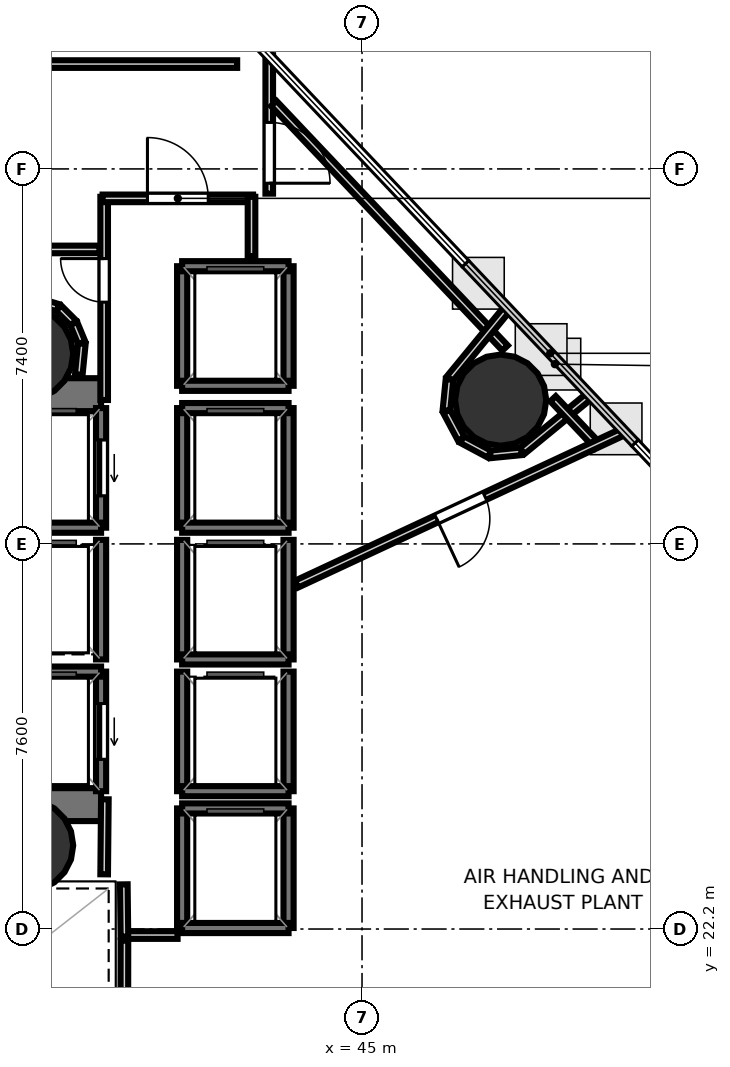
"""IFC4 building model, lengths in metres.
Left out: names, types, materials, properties, quantities, classifications, styles, units other than length and angle.
Written with IfcOpenShell. Run it as: python <this file> out.ifc"""

import sys

from ifc_helpers import new_model, si_unit, direction, frame, frame_2d, origin, origin_2d, place, context, subcontext, project, spatial, rectangle, hollow_circle, extrude, element, fill, save


model = new_model("IFC4")
c1 = context("Model", 3, precision=1e-05, world=origin(), true_north=direction((0.0, 1.0)))
c2 = subcontext(c1, "Body", "Model", "MODEL_VIEW")
j1 = project(units=[si_unit("LENGTHUNIT", "METRE"), si_unit("PLANEANGLEUNIT", "RADIAN")], contexts=[c1])
p1 = place(None, origin())
s1 = spatial("IfcSite", under=j1, at=p1, CompositionType="ELEMENT")
p2 = place(p1, origin())
s2 = spatial("IfcBuilding", under=s1, at=p2, CompositionType="ELEMENT")
p3 = place(p2, frame((0.0, 0.0, 47.9)))
s3 = spatial("IfcBuildingStorey", under=s2, at=p3, CompositionType="ELEMENT", Elevation=47.9)
p4 = place(p3, frame((29.13, 32.745, 0.0), z_axis=(0.0, 0.0, 1.0), x_axis=(1.0, 0.0, 0.0)))
e1 = element("IfcWall", 1, at=p4, inside=s3, PredefinedType="SHEAR", context=c2, shape_type="SweptSolid", body=[
    extrude(rectangle(XDim=10.72, YDim=0.65, at=frame_2d((5.36, 0.0))), origin(), (0.0, 0.0, 1.0), 4.42),
])
p5 = place(p4, frame((1.095, 0.0, 0.0)))
e2 = element("IfcOpeningElement", 2, at=p5, cuts=e1, PredefinedType="OPENING", context=c2, shape_type="SweptSolid", body=[
    extrude(rectangle(XDim=1.25, YDim=2.15, at=frame_2d((0.625, 1.075))), frame((0.0, 0.335, 0.0), z_axis=(0.0, -1.0, 0.0), x_axis=(1.0, 0.0, 0.0)), (0.0, 0.0, 1.0), 0.67),
])
p6 = place(p3, frame((29.13, 24.655, 0.0), z_axis=(0.0, 0.0, 1.0), x_axis=(1.0, 0.0, 0.0)))
e3 = element("IfcWall", 3, at=p6, inside=s3, PredefinedType="SHEAR", context=c2, shape_type="SweptSolid", body=[
    extrude(rectangle(XDim=10.72, YDim=0.65, at=frame_2d((5.36, 0.0))), origin(), (0.0, 0.0, 1.0), 4.42),
])
p7 = place(p6, frame((0.895, 0.0, 0.0)))
e4 = element("IfcOpeningElement", 4, at=p7, cuts=e3, PredefinedType="OPENING", context=c2, shape_type="SweptSolid", body=[
    extrude(rectangle(XDim=1.25, YDim=2.15, at=frame_2d((0.625, 1.075))), frame((0.0, 0.335, 0.0), z_axis=(0.0, -1.0, 0.0), x_axis=(1.0, 0.0, 0.0)), (0.0, 0.0, 1.0), 0.67),
])
for number, where, z_axis, x_axis in (
    (5, (38.4, 33.55, 0.0), (0.0, 0.0, 1.0), (1.0, 0.0, 0.0)),
    (6, (38.4, 23.85, 0.0), (0.0, 0.0, 1.0), (1.0, 0.0, 0.0)),
    (7, (47.736, 32.637, 0.0), (0.0, 0.0, 1.0), (1.0, 0.0, 0.0)),
):
    element("IfcColumn", number, at=place(p3, frame(where, z_axis=z_axis, x_axis=x_axis)), inside=s3, PredefinedType="COLUMN", context=c2, shape_type="SweptSolid", body=[
        extrude(hollow_circle(Radius=0.9, WallThickness=0.045, at=origin_2d()), origin(), (0.0, 0.0, 1.0), 4.6),
    ])
p8 = place(p3, frame((39.85, 30.12, 0.0), z_axis=(0.0, 0.0, 1.0), x_axis=(0.0, 1.0, 0.0)))
e8 = element("IfcWall", 8, at=p8, inside=s3, PredefinedType="SOLIDWALL", context=c2, shape_type="SweptSolid", body=[
    extrude(rectangle(XDim=2.36, YDim=0.2, at=frame_2d((1.18, 0.0))), origin(), (0.0, 0.0, 1.0), 4.42),
])
p9 = place(p8, frame((0.63, 0.0, 0.0)))
e9 = element("IfcOpeningElement", 9, at=p9, cuts=e8, PredefinedType="OPENING", context=c2, shape_type="SweptSolid", body=[
    extrude(rectangle(XDim=1.1, YDim=2.15, at=frame_2d((0.55, 1.075))), frame((0.0, 0.11, 0.0), z_axis=(0.0, -1.0, 0.0), x_axis=(1.0, 0.0, 0.0)), (0.0, 0.0, 1.0), 0.22),
])
p10 = place(p3, frame((37.75, 30.12, 0.0), z_axis=(0.0, 0.0, 1.0), x_axis=(1.0, 0.0, 0.0)))
e10 = element("IfcWall", 10, at=p10, inside=s3, PredefinedType="SOLIDWALL", context=c2, shape_type="SweptSolid", body=[
    extrude(rectangle(XDim=2.1, YDim=0.2, at=frame_2d((1.05, 0.0))), origin(), (0.0, 0.0, 1.0), 4.42),
])
p11 = place(p3, frame((39.85, 24.92, 0.0), z_axis=(0.0, 0.0, 1.0), x_axis=(0.0, 1.0, 0.0)))
e11 = element("IfcWall", 11, at=p11, inside=s3, PredefinedType="SOLIDWALL", context=c2, shape_type="SweptSolid", body=[
    extrude(rectangle(XDim=2.36, YDim=0.2, at=frame_2d((1.18, 0.0))), origin(), (0.0, 0.0, 1.0), 4.42),
])
p12 = place(p11, frame((0.63, 0.0, 0.0)))
e12 = element("IfcOpeningElement", 12, at=p12, cuts=e11, PredefinedType="OPENING", context=c2, shape_type="SweptSolid", body=[
    extrude(rectangle(XDim=1.1, YDim=2.15, at=frame_2d((0.55, 1.075))), frame((0.0, 0.11, 0.0), z_axis=(0.0, -1.0, 0.0), x_axis=(1.0, 0.0, 0.0)), (0.0, 0.0, 1.0), 0.22),
])
p13 = place(p3, frame((37.75, 27.28, 0.0), z_axis=(0.0, 0.0, 1.0), x_axis=(1.0, 0.0, 0.0)))
e13 = element("IfcWall", 13, at=p13, inside=s3, PredefinedType="SOLIDWALL", context=c2, shape_type="SweptSolid", body=[
    extrude(rectangle(XDim=2.1, YDim=0.2, at=frame_2d((1.05, 0.0))), origin(), (0.0, 0.0, 1.0), 4.42),
])
for number, where, z_axis, x_axis in (
    (14, (43.55, 30.12, 0.0), (0.0, 0.0, 1.0), (0.0, 1.0, 0.0)),
    (15, (41.45, 30.12, 0.0), (0.0, 0.0, 1.0), (0.0, 1.0, 0.0)),
):
    element("IfcWall", number, at=place(p3, frame(where, z_axis=z_axis, x_axis=x_axis)), inside=s3, PredefinedType="SOLIDWALL", context=c2, shape_type="SweptSolid", body=[
        extrude(rectangle(XDim=2.36, YDim=0.2, at=frame_2d((1.18, 0.0))), origin(), (0.0, 0.0, 1.0), 4.42),
    ])
for number, where, z_axis, x_axis in (
    (16, (41.45, 32.48, 0.0), (0.0, 0.0, 1.0), (1.0, 0.0, 0.0)),
    (17, (41.45, 30.12, 0.0), (0.0, 0.0, 1.0), (1.0, 0.0, 0.0)),
):
    element("IfcWall", number, at=place(p3, frame(where, z_axis=z_axis, x_axis=x_axis)), inside=s3, PredefinedType="SOLIDWALL", context=c2, shape_type="SweptSolid", body=[
        extrude(rectangle(XDim=2.1, YDim=0.2, at=frame_2d((1.05, 0.0))), origin(), (0.0, 0.0, 1.0), 4.42),
    ])
for number, where, z_axis, x_axis in (
    (18, (43.55, 27.52, 0.0), (0.0, 0.0, 1.0), (0.0, 1.0, 0.0)),
    (19, (41.45, 27.52, 0.0), (0.0, 0.0, 1.0), (0.0, 1.0, 0.0)),
):
    element("IfcWall", number, at=place(p3, frame(where, z_axis=z_axis, x_axis=x_axis)), inside=s3, PredefinedType="SOLIDWALL", context=c2, shape_type="SweptSolid", body=[
        extrude(rectangle(XDim=2.36, YDim=0.2, at=frame_2d((1.18, 0.0))), origin(), (0.0, 0.0, 1.0), 4.42),
    ])
p14 = place(p3, frame((41.45, 27.52, 0.0), z_axis=(0.0, 0.0, 1.0), x_axis=(1.0, 0.0, 0.0)))
e20 = element("IfcWall", 20, at=p14, inside=s3, PredefinedType="SOLIDWALL", context=c2, shape_type="SweptSolid", body=[
    extrude(rectangle(XDim=2.1, YDim=0.2, at=frame_2d((1.05, 0.0))), origin(), (0.0, 0.0, 1.0), 4.42),
])
for number, where, z_axis, x_axis in (
    (21, (43.55, 24.92, 0.0), (0.0, 0.0, 1.0), (0.0, 1.0, 0.0)),
    (22, (41.45, 24.92, 0.0), (0.0, 0.0, 1.0), (0.0, 1.0, 0.0)),
):
    element("IfcWall", number, at=place(p3, frame(where, z_axis=z_axis, x_axis=x_axis)), inside=s3, PredefinedType="SOLIDWALL", context=c2, shape_type="SweptSolid", body=[
        extrude(rectangle(XDim=2.36, YDim=0.2, at=frame_2d((1.18, 0.0))), origin(), (0.0, 0.0, 1.0), 4.42),
    ])
p15 = place(p3, frame((41.45, 24.92, 0.0), z_axis=(0.0, 0.0, 1.0), x_axis=(1.0, 0.0, 0.0)))
e23 = element("IfcWall", 23, at=p15, inside=s3, PredefinedType="SOLIDWALL", context=c2, shape_type="SweptSolid", body=[
    extrude(rectangle(XDim=2.1, YDim=0.2, at=frame_2d((1.05, 0.0))), origin(), (0.0, 0.0, 1.0), 4.42),
])
p16 = place(p3, frame((39.85, 27.52, 0.0), z_axis=(0.0, 0.0, 1.0), x_axis=(0.0, 1.0, 0.0)))
e24 = element("IfcWall", 24, at=p16, inside=s3, PredefinedType="SOLIDWALL", context=c2, shape_type="SweptSolid", body=[
    extrude(rectangle(XDim=2.36, YDim=0.2, at=frame_2d((1.18, 0.0))), origin(), (0.0, 0.0, 1.0), 4.42),
])
for number, where, z_axis, x_axis in (
    (25, (43.55, 22.22, 0.0), (0.0, 0.0, 1.0), (0.0, 1.0, 0.0)),
    (26, (41.45, 22.22, 0.0), (0.0, 0.0, 1.0), (0.0, 1.0, 0.0)),
):
    element("IfcWall", number, at=place(p3, frame(where, z_axis=z_axis, x_axis=x_axis)), inside=s3, PredefinedType="SOLIDWALL", context=c2, shape_type="SweptSolid", body=[
        extrude(rectangle(XDim=2.36, YDim=0.2, at=frame_2d((1.18, 0.0))), origin(), (0.0, 0.0, 1.0), 4.42),
    ])
for number, where, z_axis, x_axis in (
    (27, (41.45, 24.58, 0.0), (0.0, 0.0, 1.0), (1.0, 0.0, 0.0)),
    (28, (41.45, 22.22, 0.0), (0.0, 0.0, 1.0), (1.0, 0.0, 0.0)),
):
    element("IfcWall", number, at=place(p3, frame(where, z_axis=z_axis, x_axis=x_axis)), inside=s3, PredefinedType="SOLIDWALL", context=c2, shape_type="SweptSolid", body=[
        extrude(rectangle(XDim=2.1, YDim=0.2, at=frame_2d((1.05, 0.0))), origin(), (0.0, 0.0, 1.0), 4.42),
    ])
for number, where, z_axis, x_axis in (
    (29, (43.55, 32.92, 0.0), (0.0, 0.0, 1.0), (0.0, 1.0, 0.0)),
    (30, (41.45, 32.92, 0.0), (0.0, 0.0, 1.0), (0.0, 1.0, 0.0)),
):
    element("IfcWall", number, at=place(p3, frame(where, z_axis=z_axis, x_axis=x_axis)), inside=s3, PredefinedType="SOLIDWALL", context=c2, shape_type="SweptSolid", body=[
        extrude(rectangle(XDim=2.36, YDim=0.2, at=frame_2d((1.18, 0.0))), origin(), (0.0, 0.0, 1.0), 4.42),
    ])
for number, where, z_axis, x_axis in (
    (31, (41.45, 35.28, 0.0), (0.0, 0.0, 1.0), (1.0, 0.0, 0.0)),
    (32, (41.45, 32.92, 0.0), (0.0, 0.0, 1.0), (1.0, 0.0, 0.0)),
):
    element("IfcWall", number, at=place(p3, frame(where, z_axis=z_axis, x_axis=x_axis)), inside=s3, PredefinedType="SOLIDWALL", context=c2, shape_type="SweptSolid", body=[
        extrude(rectangle(XDim=2.1, YDim=0.2, at=frame_2d((1.05, 0.0))), origin(), (0.0, 0.0, 1.0), 4.42),
    ])
p17 = place(p3, frame((39.911, 32.64, 0.0), z_axis=(0.0, 0.0, 1.0), x_axis=(0.0, 1.0, 0.0)))
e33 = element("IfcWall", 33, at=p17, inside=s3, PredefinedType="PARTITIONING", context=c2, shape_type="SweptSolid", body=[
    extrude(rectangle(XDim=4.01, YDim=0.15, at=frame_2d((2.005, 0.0))), origin(), (0.0, 0.0, 1.0), 2.94),
])
p18 = place(p17, frame((1.93, 0.0, 0.0)))
e34 = element("IfcOpeningElement", 34, at=p18, cuts=e33, PredefinedType="OPENING", context=c2, shape_type="SweptSolid", body=[
    extrude(rectangle(XDim=0.86, YDim=2.05, at=frame_2d((0.43, 1.025))), frame((0.0, 0.085, 0.0), z_axis=(0.0, -1.0, 0.0), x_axis=(1.0, 0.0, 0.0)), (0.0, 0.0, 1.0), 0.17),
])
p19 = place(p3, frame((39.88, 36.619, 0.0), z_axis=(0.0, 0.0, 1.0), x_axis=(1.0, 0.0, 0.0)))
e35 = element("IfcWall", 35, at=p19, inside=s3, PredefinedType="PARTITIONING", context=c2, shape_type="SweptSolid", body=[
    extrude(rectangle(XDim=2.97, YDim=0.15, at=frame_2d((1.485, 0.0))), origin(), (0.0, 0.0, 1.0), 2.94),
])
p20 = place(p19, frame((0.885, 0.0, 0.0)))
e36 = element("IfcOpeningElement", 36, at=p20, cuts=e35, PredefinedType="OPENING", context=c2, shape_type="SweptSolid", body=[
    extrude(rectangle(XDim=1.2, YDim=2.15, at=frame_2d((0.6, 1.075))), frame((0.0, 0.085, 0.0), z_axis=(0.0, -1.0, 0.0), x_axis=(1.0, 0.0, 0.0)), (0.0, 0.0, 1.0), 0.17),
])
p21 = place(p3, frame((42.819, 36.65, 0.0), z_axis=(0.0, 0.0, 1.0), x_axis=(0.0, -1.0, 0.0)))
e37 = element("IfcWall", 37, at=p21, inside=s3, PredefinedType="PARTITIONING", context=c2, shape_type="SweptSolid", body=[
    extrude(rectangle(XDim=1.17, YDim=0.15, at=frame_2d((0.585, 0.0))), origin(), (0.0, 0.0, 1.0), 2.94),
])
p22 = place(p3, frame((41.36, 22.081, 0.0), z_axis=(0.0, 0.0, 1.0), x_axis=(-1.0, 0.0, 0.0)))
e38 = element("IfcWall", 38, at=p22, inside=s3, PredefinedType="PARTITIONING", context=c2, shape_type="SweptSolid", body=[
    extrude(rectangle(XDim=1.08, YDim=0.15, at=frame_2d((0.54, 0.0))), origin(), (0.0, 0.0, 1.0), 2.94),
])
p23 = place(p3, frame((40.311, 22.05, 0.0), z_axis=(0.0, 0.0, 1.0), x_axis=(-0.011836292006, 0.999929948642, 0.0)))
e39 = element("IfcWall", 39, at=p23, inside=s3, PredefinedType="PARTITIONING", context=c2, shape_type="SweptSolid", body=[
    extrude(rectangle(XDim=1.031, YDim=0.15, at=frame_2d((0.516, 0.0))), origin(), (0.0, 0.0, 1.0), 2.94),
])
p24 = place(p3, frame((39.911, 23.28, 0.0), z_axis=(0.0, 0.0, 1.0), x_axis=(0.009397771291, 0.999955839972, 0.0)))
e40 = element("IfcWall", 40, at=p24, inside=s3, PredefinedType="PARTITIONING", context=c2, shape_type="SweptSolid", body=[
    extrude(rectangle(XDim=1.481, YDim=0.15, at=frame_2d((0.74, 0.0))), origin(), (0.0, 0.0, 1.0), 2.94),
])
p25 = place(p3, frame((24.92, 39.269, 0.0), z_axis=(0.0, 0.0, 1.0), x_axis=(1.0, 0.0, 0.0)))
e41 = element("IfcWall", 41, at=p25, inside=s3, PredefinedType="PARTITIONING", context=c2, shape_type="SweptSolid", body=[
    extrude(rectangle(XDim=17.615, YDim=0.15, at=frame_2d((8.808, 0.0))), origin(), (0.0, 0.0, 1.0), 2.94),
])
p26 = place(p25, frame((8.208, 0.0, 0.0)))
e42 = element("IfcOpeningElement", 42, at=p26, cuts=e41, PredefinedType="OPENING", context=c2, shape_type="SweptSolid", body=[
    extrude(rectangle(XDim=1.2, YDim=2.15, at=frame_2d((0.6, 1.075))), frame((0.0, 0.085, 0.0), z_axis=(0.0, -1.0, 0.0), x_axis=(1.0, 0.0, 0.0)), (0.0, 0.0, 1.0), 0.17),
])
p27 = place(p3, frame((43.169, 39.444, 0.0), z_axis=(0.0, 0.0, 1.0), x_axis=(0.0, -1.0, 0.0)))
e43 = element("IfcWall", 43, at=p27, inside=s3, PredefinedType="PARTITIONING", context=c2, shape_type="SweptSolid", body=[
    extrude(rectangle(XDim=2.732, YDim=0.15, at=frame_2d((1.366, 0.0))), origin(), (0.0, 0.0, 1.0), 2.94),
])
p28 = place(p27, frame((1.326, 0.0, 0.0)))
e44 = element("IfcOpeningElement", 44, at=p28, cuts=e43, PredefinedType="OPENING", context=c2, shape_type="SweptSolid", body=[
    extrude(rectangle(XDim=1.2, YDim=2.15, at=frame_2d((0.6, 1.075))), frame((0.0, 0.085, 0.0), z_axis=(0.0, -1.0, 0.0), x_axis=(1.0, 0.0, 0.0)), (0.0, 0.0, 1.0), 0.17),
])
p29 = place(p3, frame((39.818, 35.611, 0.0), z_axis=(0.0, 0.0, 1.0), x_axis=(-1.0, 0.0, 0.0)))
e45 = element("IfcWall", 45, at=p29, inside=s3, PredefinedType="PARTITIONING", context=c2, shape_type="SweptSolid", body=[
    extrude(rectangle(XDim=7.398, YDim=0.15, at=frame_2d((3.699, 0.0))), origin(), (0.0, 0.0, 1.0), 2.94),
])
p30 = place(p3, frame((43.258, 38.492, 0.0), z_axis=(0.0, 0.0, 1.0), x_axis=(0.687175745044, -0.726491221849, 0.0)))
e46 = element("IfcWall", 46, at=p30, inside=s3, PredefinedType="PARTITIONING", context=c2, shape_type="SweptSolid", body=[
    extrude(rectangle(XDim=6.645, YDim=0.15, at=frame_2d((3.322, 0.0))), origin(), (0.0, 0.0, 1.0), 2.94),
])
p31 = place(p3, frame((47.885, 34.467, 0.0), z_axis=(0.0, 0.0, 1.0), x_axis=(-0.634429868149, -0.772980428213, 0.0)))
e47 = element("IfcWall", 47, at=p31, inside=s3, PredefinedType="PARTITIONING", context=c2, shape_type="SweptSolid", body=[
    extrude(rectangle(XDim=1.817, YDim=0.15, at=frame_2d((0.908, 0.0))), origin(), (0.0, 0.0, 1.0), 2.94),
])
for number, where, z_axis, x_axis in (
    (48, (46.726, 33.046, 0.0), (0.0, 0.0, 1.0), (-0.098, -0.995, 0.0)),
    (49, (46.669, 32.416, 0.0), (0.0, 0.0, 1.0), (0.471, -0.882, 0.0)),
    (50, (46.972, 31.86, 0.0), (0.0, 0.0, 1.0), (0.882, -0.471, 0.0)),
    (51, (47.532, 31.566, 0.0), (0.0, 0.0, 1.0), (0.995, 0.098, 0.0)),
):
    element("IfcWall", number, at=place(p3, frame(where, z_axis=z_axis, x_axis=x_axis)), inside=s3, PredefinedType="PARTITIONING", context=c2, shape_type="SweptSolid", body=[
        extrude(rectangle(XDim=0.615, YDim=0.15, at=frame_2d((0.308, 0.0))), origin(), (0.0, 0.0, 1.0), 2.94),
    ])
p32 = place(p3, frame((48.161, 31.634, 0.0), z_axis=(0.0, 0.0, 1.0), x_axis=(0.773024260779, 0.634376459405, 0.0)))
e52 = element("IfcWall", 52, at=p32, inside=s3, PredefinedType="PARTITIONING", context=c2, shape_type="SweptSolid", body=[
    extrude(rectangle(XDim=1.75, YDim=0.15, at=frame_2d((0.875, 0.0))), origin(), (0.0, 0.0, 1.0), 2.94),
])
p33 = place(p3, frame((48.769, 32.666, 0.0), z_axis=(0.0, 0.0, 1.0), x_axis=(0.687254085854, -0.726417112599, 0.0)))
e53 = element("IfcWall", 53, at=p33, inside=s3, PredefinedType="PARTITIONING", context=c2, shape_type="SweptSolid", body=[
    extrude(rectangle(XDim=1.284, YDim=0.15, at=frame_2d((0.642, 0.0))), origin(), (0.0, 0.0, 1.0), 2.94),
])
p34 = place(p3, frame((50.19, 32.029, 0.0), z_axis=(0.0, 0.0, 1.0), x_axis=(-0.906312147514, -0.422608910541, 0.0)))
e54 = element("IfcWall", 54, at=p34, inside=s3, PredefinedType="PARTITIONING", context=c2, shape_type="SweptSolid", body=[
    extrude(rectangle(XDim=7.153, YDim=0.15, at=frame_2d((3.577, 0.0))), origin(), (0.0, 0.0, 1.0), 2.94),
])
p35 = place(p34, frame((3.052, 0.0, 0.0)))
e55 = element("IfcOpeningElement", 55, at=p35, cuts=e54, PredefinedType="OPENING", context=c2, shape_type="SweptSolid", body=[
    extrude(rectangle(XDim=1.05, YDim=2.15, at=frame_2d((0.525, 1.075))), frame((0.0, 0.085, 0.0), z_axis=(0.0, -1.0, 0.0), x_axis=(1.0, 0.0, 0.0)), (0.0, 0.0, 1.0), 0.17),
])
p36 = place(p3, frame((40.306, 17.945, 0.0), z_axis=(0.0, 0.0, 1.0), x_axis=(0.001334545369, 0.999999109494, 0.0)))
e56 = element("IfcWall", 56, at=p36, inside=s3, PredefinedType="PARTITIONING", context=c2, shape_type="SweptSolid", body=[
    extrude(rectangle(XDim=4.025, YDim=0.15, at=frame_2d((2.012, 0.0))), origin(), (0.0, 0.0, 1.0), 2.94),
])
p37 = place(p3, frame((39.41, 33.141, 0.0), z_axis=(0.0, 0.0, 1.0), x_axis=(0.09797199107, 0.995189172452, 0.0)))
e57 = element("IfcWall", 57, at=p37, inside=s3, PredefinedType="PARTITIONING", context=c2, shape_type="SweptSolid", body=[
    extrude(rectangle(XDim=0.615, YDim=0.15, at=frame_2d((0.308, 0.0))), origin(), (0.0, 0.0, 1.0), 2.94),
])
for number, where, z_axis, x_axis in (
    (58, (39.468, 33.769, 0.0), (0.0, 0.0, 1.0), (-0.383, 0.924, 0.0)),
    (59, (39.303, 34.161, 0.0), (0.0, 0.0, 1.0), (-0.707, 0.707, 0.0)),
):
    element("IfcWall", number, at=place(p3, frame(where, z_axis=z_axis, x_axis=x_axis)), inside=s3, PredefinedType="PARTITIONING", context=c2, shape_type="SweptSolid", body=[
        extrude(rectangle(XDim=0.414, YDim=0.15, at=frame_2d((0.207, 0.0))), origin(), (0.0, 0.0, 1.0), 2.94),
    ])
p38 = place(p3, frame((38.998, 34.461, 0.0), z_axis=(0.0, 0.0, 1.0), x_axis=(-0.956904203315, 0.290403763195, 0.0)))
e60 = element("IfcWall", 60, at=p38, inside=s3, PredefinedType="PARTITIONING", context=c2, shape_type="SweptSolid", body=[
    extrude(rectangle(XDim=0.615, YDim=0.15, at=frame_2d((0.308, 0.0))), origin(), (0.0, 0.0, 1.0), 2.94),
])
p39 = place(p9, origin())
e61 = element("IfcDoor", 61, at=p39, inside=s3, OperationType="SLIDING_TO_LEFT", PredefinedType="DOOR", context=c2, shape_type="SweptSolid", body=[
    extrude(rectangle(XDim=1.1, YDim=2.15, at=frame_2d((0.55, 1.075))), frame((0.0, 0.025, 0.0), z_axis=(0.0, -1.0, 0.0), x_axis=(1.0, 0.0, 0.0)), (0.0, 0.0, 1.0), 0.05),
])
fill(e9, e61)
p40 = place(p12, origin())
e62 = element("IfcDoor", 62, at=p40, inside=s3, OperationType="SLIDING_TO_LEFT", PredefinedType="DOOR", context=c2, shape_type="SweptSolid", body=[
    extrude(rectangle(XDim=1.1, YDim=2.15, at=frame_2d((0.55, 1.075))), frame((0.0, 0.025, 0.0), z_axis=(0.0, -1.0, 0.0), x_axis=(1.0, 0.0, 0.0)), (0.0, 0.0, 1.0), 0.05),
])
fill(e12, e62)
p41 = place(p20, origin())
e63 = element("IfcDoor", 63, at=p41, inside=s3, OperationType="SINGLE_SWING_LEFT", PredefinedType="DOOR", context=c2, shape_type="SweptSolid", body=[
    extrude(rectangle(XDim=1.2, YDim=2.15, at=frame_2d((0.6, 1.075))), frame((0.0, 0.025, 0.0), z_axis=(0.0, -1.0, 0.0), x_axis=(1.0, 0.0, 0.0)), (0.0, 0.0, 1.0), 0.05),
])
fill(e36, e63)
p42 = place(p28, origin())
e64 = element("IfcDoor", 64, at=p42, inside=s3, OperationType="SINGLE_SWING_RIGHT", PredefinedType="DOOR", context=c2, shape_type="SweptSolid", body=[
    extrude(rectangle(XDim=1.2, YDim=2.15, at=frame_2d((0.6, 1.075))), frame((0.0, 0.025, 0.0), z_axis=(0.0, -1.0, 0.0), x_axis=(1.0, 0.0, 0.0)), (0.0, 0.0, 1.0), 0.05),
])
fill(e44, e64)
p43 = place(p18, origin())
e65 = element("IfcDoor", 65, at=p43, inside=s3, OperationType="SINGLE_SWING_RIGHT", PredefinedType="DOOR", context=c2, shape_type="SweptSolid", body=[
    extrude(rectangle(XDim=0.86, YDim=2.05, at=frame_2d((0.43, 1.025))), frame((0.0, 0.025, 0.0), z_axis=(0.0, -1.0, 0.0), x_axis=(1.0, 0.0, 0.0)), (0.0, 0.0, 1.0), 0.05),
])
fill(e34, e65)
p44 = place(p35, origin())
e66 = element("IfcDoor", 66, at=p44, inside=s3, OperationType="SINGLE_SWING_RIGHT", PredefinedType="DOOR", context=c2, shape_type="SweptSolid", body=[
    extrude(rectangle(XDim=1.05, YDim=2.15, at=frame_2d((0.525, 1.075))), frame((0.0, 0.025, 0.0), z_axis=(0.0, -1.0, 0.0), x_axis=(1.0, 0.0, 0.0)), (0.0, 0.0, 1.0), 0.05),
])
fill(e55, e66)
save(model, sys.argv[1])
